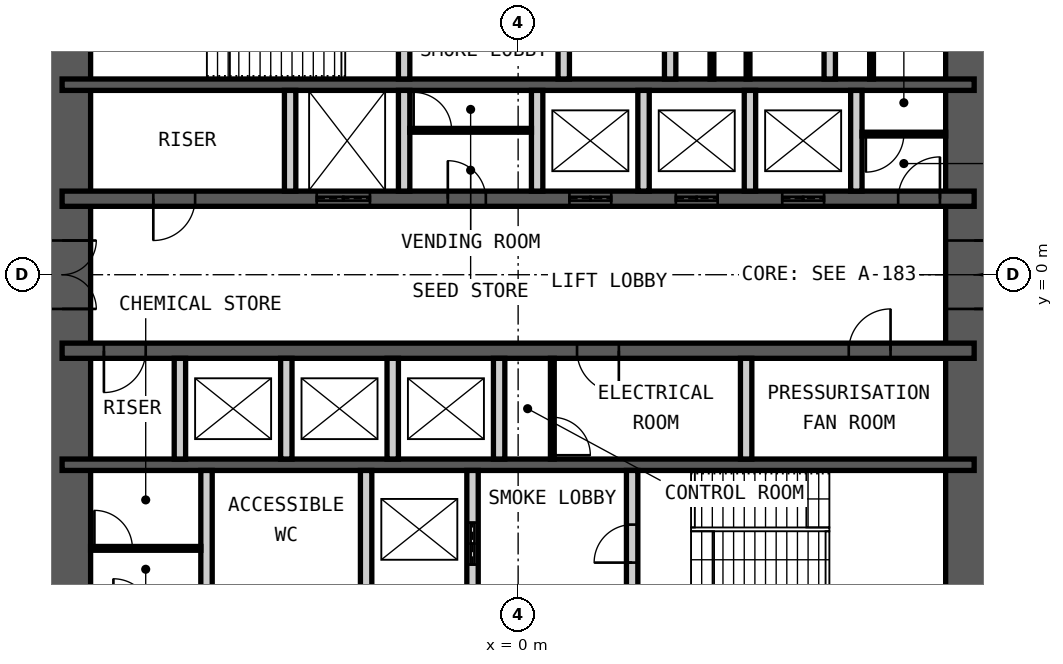
"""IFC4 building model, lengths in metres.
Left out: names, types, materials, properties, quantities, classifications, styles, units other than length and angle.
Written with IfcOpenShell. Run it as: python <this file> out.ifc"""

import sys

from ifc_helpers import new_model, si_unit, direction, frame, frame_2d, origin, place, context, subcontext, project, spatial, rectangle, extrude, element, fill, save


model = new_model("IFC4")
c1 = context("Model", 3, precision=1e-05, world=origin(), true_north=direction((0.0, 1.0)))
c2 = subcontext(c1, "Body", "Model", "MODEL_VIEW")
j1 = project(units=[si_unit("LENGTHUNIT", "METRE"), si_unit("PLANEANGLEUNIT", "RADIAN")], contexts=[c1])
p1 = place(None, origin())
s1 = spatial("IfcSite", under=j1, at=p1, CompositionType="ELEMENT")
p2 = place(p1, origin())
s2 = spatial("IfcBuilding", under=s1, at=p2, CompositionType="ELEMENT")
p3 = place(p2, frame((0.0, 0.0, 27.0)))
s3 = spatial("IfcBuildingStorey", under=s2, at=p3, CompositionType="ELEMENT", Elevation=27.0)
p4 = place(p3, frame((12.0, -9.0, 0.0), z_axis=(0.0, 0.0, 1.0), x_axis=(0.0, 1.0, 0.0)))
e1 = element("IfcWall", 1, at=p4, inside=s3, PredefinedType="SHEAR", context=c2, shape_type="SweptSolid", body=[
    extrude(rectangle(XDim=18.0, YDim=1.5, at=frame_2d((9.0, 0.0))), origin(), (0.0, 0.0, 1.0), 5.0),
])
p5 = place(p4, frame((8.1, 0.0, 0.0)))
e2 = element("IfcOpeningElement", 2, at=p5, cuts=e1, PredefinedType="OPENING", context=c2, shape_type="SweptSolid", body=[
    extrude(rectangle(XDim=1.8, YDim=2.1, at=frame_2d((0.9, 1.05))), frame((0.0, 0.76, 0.0), z_axis=(0.0, -1.0, 0.0), x_axis=(1.0, 0.0, 0.0)), (0.0, 0.0, 1.0), 1.52),
])
p6 = place(p3, frame((-12.0, -9.0, 0.0), z_axis=(0.0, 0.0, 1.0), x_axis=(0.0, 1.0, 0.0)))
e3 = element("IfcWall", 3, at=p6, inside=s3, PredefinedType="SHEAR", context=c2, shape_type="SweptSolid", body=[
    extrude(rectangle(XDim=18.0, YDim=1.5, at=frame_2d((9.0, 0.0))), origin(), (0.0, 0.0, 1.0), 5.0),
])
p7 = place(p6, frame((8.1, 0.0, 0.0)))
e4 = element("IfcOpeningElement", 4, at=p7, cuts=e3, PredefinedType="OPENING", context=c2, shape_type="SweptSolid", body=[
    extrude(rectangle(XDim=1.8, YDim=2.1, at=frame_2d((0.9, 1.05))), frame((0.0, 0.76, 0.0), z_axis=(0.0, -1.0, 0.0), x_axis=(1.0, 0.0, 0.0)), (0.0, 0.0, 1.0), 1.52),
])
p8 = place(p3, frame((-12.0, 5.0, 0.0), z_axis=(0.0, 0.0, 1.0), x_axis=(1.0, 0.0, 0.0)))
e5 = element("IfcWall", 5, at=p8, inside=s3, PredefinedType="SHEAR", context=c2, shape_type="SweptSolid", body=[
    extrude(rectangle(XDim=24.0, YDim=0.3, at=frame_2d((12.0, 0.0))), origin(), (0.0, 0.0, 1.0), 5.0),
])
p9 = place(p3, frame((-12.0, 2.0, 0.0), z_axis=(0.0, 0.0, 1.0), x_axis=(1.0, 0.0, 0.0)))
e6 = element("IfcWall", 6, at=p9, inside=s3, PredefinedType="SHEAR", context=c2, shape_type="SweptSolid", body=[
    extrude(rectangle(XDim=24.0, YDim=0.4, at=frame_2d((12.0, 0.0))), origin(), (0.0, 0.0, 1.0), 5.0),
])
p10 = place(p9, frame((2.4, 0.0, 0.0)))
e7 = element("IfcOpeningElement", 7, at=p10, cuts=e6, PredefinedType="OPENING", context=c2, shape_type="SweptSolid", body=[
    extrude(rectangle(XDim=1.1, YDim=2.1, at=frame_2d((0.55, 1.05))), frame((0.0, 0.21, 0.0), z_axis=(0.0, -1.0, 0.0), x_axis=(1.0, 0.0, 0.0)), (0.0, 0.0, 1.0), 0.42),
])
p11 = place(p9, frame((22.0, 0.0, 0.0)))
e8 = element("IfcOpeningElement", 8, at=p11, cuts=e6, PredefinedType="OPENING", context=c2, shape_type="SweptSolid", body=[
    extrude(rectangle(XDim=1.1, YDim=2.1, at=frame_2d((0.55, 1.05))), frame((0.0, 0.21, 0.0), z_axis=(0.0, -1.0, 0.0), x_axis=(1.0, 0.0, 0.0)), (0.0, 0.0, 1.0), 0.42),
])
p12 = place(p9, frame((10.15, 0.0, 0.0)))
e9 = element("IfcOpeningElement", 9, at=p12, cuts=e6, PredefinedType="OPENING", context=c2, shape_type="SweptSolid", body=[
    extrude(rectangle(XDim=1.0, YDim=2.1, at=frame_2d((0.5, 1.05))), frame((0.0, 0.21, 0.0), z_axis=(0.0, -1.0, 0.0), x_axis=(1.0, 0.0, 0.0)), (0.0, 0.0, 1.0), 0.42),
])
p13 = place(p9, frame((6.7, 0.0, 0.0)))
e10 = element("IfcOpeningElement", 10, at=p13, cuts=e6, PredefinedType="OPENING", context=c2, shape_type="SweptSolid", body=[
    extrude(rectangle(XDim=1.4, YDim=2.4, at=frame_2d((0.7, 1.2))), frame((0.0, 0.21, 0.0), z_axis=(0.0, -1.0, 0.0), x_axis=(1.0, 0.0, 0.0)), (0.0, 0.0, 1.0), 0.42),
])
p14 = place(p9, frame((13.35, 0.0, 0.0)))
e11 = element("IfcOpeningElement", 11, at=p14, cuts=e6, PredefinedType="OPENING", context=c2, shape_type="SweptSolid", body=[
    extrude(rectangle(XDim=1.1, YDim=2.4, at=frame_2d((0.55, 1.2))), frame((0.0, 0.21, 0.0), z_axis=(0.0, -1.0, 0.0), x_axis=(1.0, 0.0, 0.0)), (0.0, 0.0, 1.0), 0.42),
])
p15 = place(p9, frame((16.15, 0.0, 0.0)))
e12 = element("IfcOpeningElement", 12, at=p15, cuts=e6, PredefinedType="OPENING", context=c2, shape_type="SweptSolid", body=[
    extrude(rectangle(XDim=1.1, YDim=2.4, at=frame_2d((0.55, 1.2))), frame((0.0, 0.21, 0.0), z_axis=(0.0, -1.0, 0.0), x_axis=(1.0, 0.0, 0.0)), (0.0, 0.0, 1.0), 0.42),
])
p16 = place(p9, frame((18.95, 0.0, 0.0)))
e13 = element("IfcOpeningElement", 13, at=p16, cuts=e6, PredefinedType="OPENING", context=c2, shape_type="SweptSolid", body=[
    extrude(rectangle(XDim=1.1, YDim=2.4, at=frame_2d((0.55, 1.2))), frame((0.0, 0.21, 0.0), z_axis=(0.0, -1.0, 0.0), x_axis=(1.0, 0.0, 0.0)), (0.0, 0.0, 1.0), 0.42),
])
p17 = place(p3, frame((-12.0, -2.0, 0.0), z_axis=(0.0, 0.0, 1.0), x_axis=(1.0, 0.0, 0.0)))
e14 = element("IfcWall", 14, at=p17, inside=s3, PredefinedType="SHEAR", context=c2, shape_type="SweptSolid", body=[
    extrude(rectangle(XDim=24.0, YDim=0.4, at=frame_2d((12.0, 0.0))), origin(), (0.0, 0.0, 1.0), 5.0),
])
p18 = place(p17, frame((1.1, 0.0, 0.0)))
e15 = element("IfcOpeningElement", 15, at=p18, cuts=e14, PredefinedType="OPENING", context=c2, shape_type="SweptSolid", body=[
    extrude(rectangle(XDim=1.1, YDim=2.1, at=frame_2d((0.55, 1.05))), frame((0.0, 0.21, 0.0), z_axis=(0.0, -1.0, 0.0), x_axis=(1.0, 0.0, 0.0)), (0.0, 0.0, 1.0), 0.42),
])
p19 = place(p17, frame((13.55, 0.0, 0.0)))
e16 = element("IfcOpeningElement", 16, at=p19, cuts=e14, PredefinedType="OPENING", context=c2, shape_type="SweptSolid", body=[
    extrude(rectangle(XDim=1.1, YDim=2.1, at=frame_2d((0.55, 1.05))), frame((0.0, 0.21, 0.0), z_axis=(0.0, -1.0, 0.0), x_axis=(1.0, 0.0, 0.0)), (0.0, 0.0, 1.0), 0.42),
])
p20 = place(p17, frame((20.7, 0.0, 0.0)))
e17 = element("IfcOpeningElement", 17, at=p20, cuts=e14, PredefinedType="OPENING", context=c2, shape_type="SweptSolid", body=[
    extrude(rectangle(XDim=1.1, YDim=2.1, at=frame_2d((0.55, 1.05))), frame((0.0, 0.21, 0.0), z_axis=(0.0, -1.0, 0.0), x_axis=(1.0, 0.0, 0.0)), (0.0, 0.0, 1.0), 0.42),
])
p21 = place(p3, frame((-12.0, -5.0, 0.0), z_axis=(0.0, 0.0, 1.0), x_axis=(1.0, 0.0, 0.0)))
e18 = element("IfcWall", 18, at=p21, inside=s3, PredefinedType="SHEAR", context=c2, shape_type="SweptSolid", body=[
    extrude(rectangle(XDim=24.0, YDim=0.3, at=frame_2d((12.0, 0.0))), origin(), (0.0, 0.0, 1.0), 5.0),
])
p22 = place(p3, frame((-3.0, 5.15, 0.0), z_axis=(0.0, 0.0, 1.0), x_axis=(0.0, 1.0, 0.0)))
e19 = element("IfcWall", 19, at=p22, inside=s3, PredefinedType="PARTITIONING", context=c2, shape_type="SweptSolid", body=[
    extrude(rectangle(XDim=3.85, YDim=0.3, at=frame_2d((1.925, 0.0))), origin(), (0.0, 0.0, 1.0), 4.78),
])
p23 = place(p22, frame((1.425, 0.0, 0.0)))
e20 = element("IfcOpeningElement", 20, at=p23, cuts=e19, PredefinedType="OPENING", context=c2, shape_type="SweptSolid", body=[
    extrude(rectangle(XDim=1.0, YDim=2.1, at=frame_2d((0.5, 1.05))), frame((0.0, 0.16, 0.0), z_axis=(0.0, -1.0, 0.0), x_axis=(1.0, 0.0, 0.0)), (0.0, 0.0, 1.0), 0.32),
])
p24 = place(p3, frame((1.2, 5.15, 0.0), z_axis=(0.0, 0.0, 1.0), x_axis=(0.0, 1.0, 0.0)))
e21 = element("IfcWall", 21, at=p24, inside=s3, PredefinedType="PARTITIONING", context=c2, shape_type="SweptSolid", body=[
    extrude(rectangle(XDim=3.85, YDim=0.3, at=frame_2d((1.925, 0.0))), origin(), (0.0, 0.0, 1.0), 4.78),
])
p25 = place(p24, frame((1.375, 0.0, 0.0)))
e22 = element("IfcOpeningElement", 22, at=p25, cuts=e21, PredefinedType="OPENING", context=c2, shape_type="SweptSolid", body=[
    extrude(rectangle(XDim=1.1, YDim=2.4, at=frame_2d((0.55, 1.2))), frame((0.0, 0.16, 0.0), z_axis=(0.0, -1.0, 0.0), x_axis=(1.0, 0.0, 0.0)), (0.0, 0.0, 1.0), 0.32),
])
for number, where, z_axis, x_axis in (
    (23, (4.0, 5.15, 0.0), (0.0, 0.0, 1.0), (0.0, 1.0, 0.0)),
    (24, (8.2, 5.15, 0.0), (0.0, 0.0, 1.0), (0.0, 1.0, 0.0)),
):
    element("IfcWall", number, at=place(p3, frame(where, z_axis=z_axis, x_axis=x_axis)), inside=s3, PredefinedType="PARTITIONING", context=c2, shape_type="SweptSolid", body=[
        extrude(rectangle(XDim=3.85, YDim=0.3, at=frame_2d((1.925, 0.0))), origin(), (0.0, 0.0, 1.0), 4.78),
    ])
for number, where, z_axis, x_axis in (
    (25, (-6.0, 2.2, 0.0), (0.0, 0.0, 1.0), (0.0, 1.0, 0.0)),
    (26, (-3.0, 2.2, 0.0), (0.0, 0.0, 1.0), (0.0, 1.0, 0.0)),
    (27, (0.5, 2.2, 0.0), (0.0, 0.0, 1.0), (0.0, 1.0, 0.0)),
    (28, (3.3, 2.2, 0.0), (0.0, 0.0, 1.0), (0.0, 1.0, 0.0)),
    (29, (6.1, 2.2, 0.0), (0.0, 0.0, 1.0), (0.0, 1.0, 0.0)),
    (30, (8.9, 2.2, 0.0), (0.0, 0.0, 1.0), (0.0, 1.0, 0.0)),
    (31, (-8.9, -4.85, 0.0), (0.0, 0.0, 1.0), (0.0, 1.0, 0.0)),
    (32, (-6.1, -4.85, 0.0), (0.0, 0.0, 1.0), (0.0, 1.0, 0.0)),
    (33, (-3.3, -4.85, 0.0), (0.0, 0.0, 1.0), (0.0, 1.0, 0.0)),
    (34, (-0.5, -4.85, 0.0), (0.0, 0.0, 1.0), (0.0, 1.0, 0.0)),
    (35, (6.0, -4.85, 0.0), (0.0, 0.0, 1.0), (0.0, 1.0, 0.0)),
):
    element("IfcWall", number, at=place(p3, frame(where, z_axis=z_axis, x_axis=x_axis)), inside=s3, PredefinedType="PARTITIONING", context=c2, shape_type="SweptSolid", body=[
        extrude(rectangle(XDim=2.65, YDim=0.3, at=frame_2d((1.325, 0.0))), origin(), (0.0, 0.0, 1.0), 4.78),
    ])
for number, where, z_axis, x_axis in (
    (36, (-8.2, -9.0, 0.0), (0.0, 0.0, 1.0), (0.0, 1.0, 0.0)),
    (37, (-4.0, -9.0, 0.0), (0.0, 0.0, 1.0), (0.0, 1.0, 0.0)),
):
    element("IfcWall", number, at=place(p3, frame(where, z_axis=z_axis, x_axis=x_axis)), inside=s3, PredefinedType="PARTITIONING", context=c2, shape_type="SweptSolid", body=[
        extrude(rectangle(XDim=3.85, YDim=0.3, at=frame_2d((1.925, 0.0))), origin(), (0.0, 0.0, 1.0), 4.78),
    ])
p26 = place(p3, frame((-1.2, -9.0, 0.0), z_axis=(0.0, 0.0, 1.0), x_axis=(0.0, 1.0, 0.0)))
e38 = element("IfcWall", 38, at=p26, inside=s3, PredefinedType="PARTITIONING", context=c2, shape_type="SweptSolid", body=[
    extrude(rectangle(XDim=3.85, YDim=0.3, at=frame_2d((1.925, 0.0))), origin(), (0.0, 0.0, 1.0), 4.78),
])
p27 = place(p26, frame((1.375, 0.0, 0.0)))
e39 = element("IfcOpeningElement", 39, at=p27, cuts=e38, PredefinedType="OPENING", context=c2, shape_type="SweptSolid", body=[
    extrude(rectangle(XDim=1.1, YDim=2.4, at=frame_2d((0.55, 1.2))), frame((0.0, 0.16, 0.0), z_axis=(0.0, -1.0, 0.0), x_axis=(1.0, 0.0, 0.0)), (0.0, 0.0, 1.0), 0.32),
])
p28 = place(p3, frame((3.0, -9.0, 0.0), z_axis=(0.0, 0.0, 1.0), x_axis=(0.0, 1.0, 0.0)))
e40 = element("IfcWall", 40, at=p28, inside=s3, PredefinedType="PARTITIONING", context=c2, shape_type="SweptSolid", body=[
    extrude(rectangle(XDim=3.85, YDim=0.3, at=frame_2d((1.925, 0.0))), origin(), (0.0, 0.0, 1.0), 4.78),
])
p29 = place(p28, frame((1.425, 0.0, 0.0)))
e41 = element("IfcOpeningElement", 41, at=p29, cuts=e40, PredefinedType="OPENING", context=c2, shape_type="SweptSolid", body=[
    extrude(rectangle(XDim=1.0, YDim=2.1, at=frame_2d((0.5, 1.05))), frame((0.0, 0.16, 0.0), z_axis=(0.0, -1.0, 0.0), x_axis=(1.0, 0.0, 0.0)), (0.0, 0.0, 1.0), 0.32),
])
p30 = place(p3, frame((-2.85, 3.8, 0.0), z_axis=(0.0, 0.0, 1.0), x_axis=(1.0, 0.0, 0.0)))
e42 = element("IfcWall", 42, at=p30, inside=s3, PredefinedType="PARTITIONING", context=c2, shape_type="SweptSolid", body=[
    extrude(rectangle(XDim=3.2, YDim=0.1, at=frame_2d((1.6, 0.0))), origin(), (0.0, 0.0, 1.0), 4.78),
])
p31 = place(p30, frame((0.1, 0.0, 0.0)))
e43 = element("IfcOpeningElement", 43, at=p31, cuts=e42, PredefinedType="OPENING", context=c2, shape_type="SweptSolid", body=[
    extrude(rectangle(XDim=1.0, YDim=2.4, at=frame_2d((0.5, 1.2))), frame((0.0, 0.06, 0.0), z_axis=(0.0, -1.0, 0.0), x_axis=(1.0, 0.0, 0.0)), (0.0, 0.0, 1.0), 0.12),
])
p32 = place(p3, frame((0.9, -4.85, 0.0), z_axis=(0.0, 0.0, 1.0), x_axis=(0.0, 1.0, 0.0)))
e44 = element("IfcWall", 44, at=p32, inside=s3, PredefinedType="PARTITIONING", context=c2, shape_type="SweptSolid", body=[
    extrude(rectangle(XDim=2.65, YDim=0.1, at=frame_2d((1.325, 0.0))), origin(), (0.0, 0.0, 1.0), 4.78),
])
p33 = place(p32, frame((0.1, 0.0, 0.0)))
e45 = element("IfcOpeningElement", 45, at=p33, cuts=e44, PredefinedType="OPENING", context=c2, shape_type="SweptSolid", body=[
    extrude(rectangle(XDim=1.0, YDim=2.4, at=frame_2d((0.5, 1.2))), frame((0.0, 0.06, 0.0), z_axis=(0.0, -1.0, 0.0), x_axis=(1.0, 0.0, 0.0)), (0.0, 0.0, 1.0), 0.12),
])
p34 = place(p3, frame((-11.25, -7.2, 0.0), z_axis=(0.0, 0.0, 1.0), x_axis=(1.0, 0.0, 0.0)))
e46 = element("IfcWall", 46, at=p34, inside=s3, PredefinedType="PARTITIONING", context=c2, shape_type="SweptSolid", body=[
    extrude(rectangle(XDim=2.9, YDim=0.1, at=frame_2d((1.45, 0.0))), origin(), (0.0, 0.0, 1.0), 4.78),
])
p35 = place(p34, frame((0.1, 0.0, 0.0)))
e47 = element("IfcOpeningElement", 47, at=p35, cuts=e46, PredefinedType="OPENING", context=c2, shape_type="SweptSolid", body=[
    extrude(rectangle(XDim=1.0, YDim=2.4, at=frame_2d((0.5, 1.2))), frame((0.0, 0.06, 0.0), z_axis=(0.0, -1.0, 0.0), x_axis=(1.0, 0.0, 0.0)), (0.0, 0.0, 1.0), 0.12),
])
p36 = place(p3, frame((9.05, 3.7, 0.0), z_axis=(0.0, 0.0, 1.0), x_axis=(1.0, 0.0, 0.0)))
e48 = element("IfcWall", 48, at=p36, inside=s3, PredefinedType="PARTITIONING", context=c2, shape_type="SweptSolid", body=[
    extrude(rectangle(XDim=2.2, YDim=0.1, at=frame_2d((1.1, 0.0))), origin(), (0.0, 0.0, 1.0), 4.78),
])
p37 = place(p36, frame((0.1, 0.0, 0.0)))
e49 = element("IfcOpeningElement", 49, at=p37, cuts=e48, PredefinedType="OPENING", context=c2, shape_type="SweptSolid", body=[
    extrude(rectangle(XDim=1.0, YDim=2.4, at=frame_2d((0.5, 1.2))), frame((0.0, 0.06, 0.0), z_axis=(0.0, -1.0, 0.0), x_axis=(1.0, 0.0, 0.0)), (0.0, 0.0, 1.0), 0.12),
])
for number, where, z_axis, x_axis in (
    (50, (5.1, 5.15, 0.0), (0.0, 0.0, 1.0), (0.0, 1.0, 0.0)),
    (51, (6.05, 5.15, 0.0), (0.0, 0.0, 1.0), (0.0, 1.0, 0.0)),
    (52, (9.3, 5.15, 0.0), (0.0, 0.0, 1.0), (0.0, 1.0, 0.0)),
):
    element("IfcWall", number, at=place(p3, frame(where, z_axis=z_axis, x_axis=x_axis)), inside=s3, PredefinedType="PARTITIONING", context=c2, shape_type="SweptSolid", body=[
        extrude(rectangle(XDim=1.5, YDim=0.1, at=frame_2d((0.75, 0.0))), origin(), (0.0, 0.0, 1.0), 2.1),
    ])
p38 = place(p29, origin())
e53 = element("IfcDoor", 53, at=p38, inside=s3, OperationType="SINGLE_SWING_RIGHT", PredefinedType="DOOR", context=c2, shape_type="SweptSolid", body=[
    extrude(rectangle(XDim=1.0, YDim=2.1, at=frame_2d((0.5, 1.05))), frame((0.0, 0.025, 0.0), z_axis=(0.0, -1.0, 0.0), x_axis=(1.0, 0.0, 0.0)), (0.0, 0.0, 1.0), 0.05),
])
fill(e41, e53)
p39 = place(p10, origin())
e54 = element("IfcDoor", 54, at=p39, inside=s3, OperationType="SINGLE_SWING_LEFT", PredefinedType="DOOR", context=c2, shape_type="SweptSolid", body=[
    extrude(rectangle(XDim=1.1, YDim=2.1, at=frame_2d((0.55, 1.05))), frame((0.0, 0.025, 0.0), z_axis=(0.0, -1.0, 0.0), x_axis=(1.0, 0.0, 0.0)), (0.0, 0.0, 1.0), 0.05),
])
fill(e7, e54)
p40 = place(p18, origin())
e55 = element("IfcDoor", 55, at=p40, inside=s3, OperationType="SINGLE_SWING_LEFT", PredefinedType="DOOR", context=c2, shape_type="SweptSolid", body=[
    extrude(rectangle(XDim=1.1, YDim=2.1, at=frame_2d((0.55, 1.05))), frame((0.0, 0.025, 0.0), z_axis=(0.0, -1.0, 0.0), x_axis=(1.0, 0.0, 0.0)), (0.0, 0.0, 1.0), 0.05),
])
fill(e15, e55)
p41 = place(p11, origin())
e56 = element("IfcDoor", 56, at=p41, inside=s3, OperationType="SINGLE_SWING_LEFT", PredefinedType="DOOR", context=c2, shape_type="SweptSolid", body=[
    extrude(rectangle(XDim=1.1, YDim=2.1, at=frame_2d((0.55, 1.05))), frame((0.0, 0.025, 0.0), z_axis=(0.0, -1.0, 0.0), x_axis=(1.0, 0.0, 0.0)), (0.0, 0.0, 1.0), 0.05),
])
fill(e8, e56)
p42 = place(p12, origin())
e57 = element("IfcDoor", 57, at=p42, inside=s3, OperationType="SINGLE_SWING_RIGHT", PredefinedType="DOOR", context=c2, shape_type="SweptSolid", body=[
    extrude(rectangle(XDim=1.0, YDim=2.1, at=frame_2d((0.5, 1.05))), frame((0.0, 0.025, 0.0), z_axis=(0.0, -1.0, 0.0), x_axis=(1.0, 0.0, 0.0)), (0.0, 0.0, 1.0), 0.05),
])
fill(e9, e57)
p43 = place(p19, origin())
e58 = element("IfcDoor", 58, at=p43, inside=s3, OperationType="SINGLE_SWING_RIGHT", PredefinedType="DOOR", context=c2, shape_type="SweptSolid", body=[
    extrude(rectangle(XDim=1.1, YDim=2.1, at=frame_2d((0.55, 1.05))), frame((0.0, 0.025, 0.0), z_axis=(0.0, -1.0, 0.0), x_axis=(1.0, 0.0, 0.0)), (0.0, 0.0, 1.0), 0.05),
])
fill(e16, e58)
p44 = place(p20, origin())
e59 = element("IfcDoor", 59, at=p44, inside=s3, OperationType="SINGLE_SWING_LEFT", PredefinedType="DOOR", context=c2, shape_type="SweptSolid", body=[
    extrude(rectangle(XDim=1.1, YDim=2.1, at=frame_2d((0.55, 1.05))), frame((0.0, 0.025, 0.0), z_axis=(0.0, -1.0, 0.0), x_axis=(1.0, 0.0, 0.0)), (0.0, 0.0, 1.0), 0.05),
])
fill(e17, e59)
p45 = place(p5, origin())
e60 = element("IfcDoor", 60, at=p45, inside=s3, OperationType="DOUBLE_DOOR_DOUBLE_SWING", PredefinedType="DOOR", context=c2, shape_type="SweptSolid", body=[
    extrude(rectangle(XDim=1.8, YDim=2.1, at=frame_2d((0.9, 1.05))), frame((0.0, 0.025, 0.0), z_axis=(0.0, -1.0, 0.0), x_axis=(1.0, 0.0, 0.0)), (0.0, 0.0, 1.0), 0.05),
])
fill(e2, e60)
p46 = place(p7, origin())
e61 = element("IfcDoor", 61, at=p46, inside=s3, OperationType="DOUBLE_DOOR_DOUBLE_SWING", PredefinedType="DOOR", context=c2, shape_type="SweptSolid", body=[
    extrude(rectangle(XDim=1.8, YDim=2.1, at=frame_2d((0.9, 1.05))), frame((0.0, 0.025, 0.0), z_axis=(0.0, -1.0, 0.0), x_axis=(1.0, 0.0, 0.0)), (0.0, 0.0, 1.0), 0.05),
])
fill(e4, e61)
p47 = place(p27, origin())
e62 = element("IfcDoor", 62, at=p47, inside=s3, OperationType="DOUBLE_DOOR_SLIDING", PredefinedType="DOOR", context=c2, shape_type="SweptSolid", body=[
    extrude(rectangle(XDim=1.1, YDim=2.4, at=frame_2d((0.55, 1.2))), frame((0.0, 0.025, 0.0), z_axis=(0.0, -1.0, 0.0), x_axis=(1.0, 0.0, 0.0)), (0.0, 0.0, 1.0), 0.05),
])
fill(e39, e62)
p48 = place(p13, origin())
e63 = element("IfcDoor", 63, at=p48, inside=s3, OperationType="DOUBLE_DOOR_SLIDING", PredefinedType="DOOR", context=c2, shape_type="SweptSolid", body=[
    extrude(rectangle(XDim=1.4, YDim=2.4, at=frame_2d((0.7, 1.2))), frame((0.0, 0.025, 0.0), z_axis=(0.0, -1.0, 0.0), x_axis=(1.0, 0.0, 0.0)), (0.0, 0.0, 1.0), 0.05),
])
fill(e10, e63)
p49 = place(p14, origin())
e64 = element("IfcDoor", 64, at=p49, inside=s3, OperationType="DOUBLE_DOOR_SLIDING", PredefinedType="DOOR", context=c2, shape_type="SweptSolid", body=[
    extrude(rectangle(XDim=1.1, YDim=2.4, at=frame_2d((0.55, 1.2))), frame((0.0, 0.025, 0.0), z_axis=(0.0, -1.0, 0.0), x_axis=(1.0, 0.0, 0.0)), (0.0, 0.0, 1.0), 0.05),
])
fill(e11, e64)
p50 = place(p15, origin())
e65 = element("IfcDoor", 65, at=p50, inside=s3, OperationType="DOUBLE_DOOR_SLIDING", PredefinedType="DOOR", context=c2, shape_type="SweptSolid", body=[
    extrude(rectangle(XDim=1.1, YDim=2.4, at=frame_2d((0.55, 1.2))), frame((0.0, 0.025, 0.0), z_axis=(0.0, -1.0, 0.0), x_axis=(1.0, 0.0, 0.0)), (0.0, 0.0, 1.0), 0.05),
])
fill(e12, e65)
p51 = place(p16, origin())
e66 = element("IfcDoor", 66, at=p51, inside=s3, OperationType="DOUBLE_DOOR_SLIDING", PredefinedType="DOOR", context=c2, shape_type="SweptSolid", body=[
    extrude(rectangle(XDim=1.1, YDim=2.4, at=frame_2d((0.55, 1.2))), frame((0.0, 0.025, 0.0), z_axis=(0.0, -1.0, 0.0), x_axis=(1.0, 0.0, 0.0)), (0.0, 0.0, 1.0), 0.05),
])
fill(e13, e66)
p52 = place(p31, origin())
e67 = element("IfcDoor", 67, at=p52, inside=s3, OperationType="SINGLE_SWING_RIGHT", PredefinedType="DOOR", context=c2, shape_type="SweptSolid", body=[
    extrude(rectangle(XDim=1.0, YDim=2.4, at=frame_2d((0.5, 1.2))), frame((0.0, 0.025, 0.0), z_axis=(0.0, -1.0, 0.0), x_axis=(1.0, 0.0, 0.0)), (0.0, 0.0, 1.0), 0.05),
])
fill(e43, e67)
p53 = place(p33, origin())
e68 = element("IfcDoor", 68, at=p53, inside=s3, OperationType="SINGLE_SWING_LEFT", PredefinedType="DOOR", context=c2, shape_type="SweptSolid", body=[
    extrude(rectangle(XDim=1.0, YDim=2.4, at=frame_2d((0.5, 1.2))), frame((0.0, 0.025, 0.0), z_axis=(0.0, -1.0, 0.0), x_axis=(1.0, 0.0, 0.0)), (0.0, 0.0, 1.0), 0.05),
])
fill(e45, e68)
p54 = place(p35, origin())
e69 = element("IfcDoor", 69, at=p54, inside=s3, OperationType="SINGLE_SWING_RIGHT", PredefinedType="DOOR", context=c2, shape_type="SweptSolid", body=[
    extrude(rectangle(XDim=1.0, YDim=2.4, at=frame_2d((0.5, 1.2))), frame((0.0, 0.025, 0.0), z_axis=(0.0, -1.0, 0.0), x_axis=(1.0, 0.0, 0.0)), (0.0, 0.0, 1.0), 0.05),
])
fill(e47, e69)
p55 = place(p37, origin())
e70 = element("IfcDoor", 70, at=p55, inside=s3, OperationType="SINGLE_SWING_LEFT", PredefinedType="DOOR", context=c2, shape_type="SweptSolid", body=[
    extrude(rectangle(XDim=1.0, YDim=2.4, at=frame_2d((0.5, 1.2))), frame((0.0, 0.025, 0.0), z_axis=(0.0, -1.0, 0.0), x_axis=(1.0, 0.0, 0.0)), (0.0, 0.0, 1.0), 0.05),
])
fill(e49, e70)
save(model, sys.argv[1])
